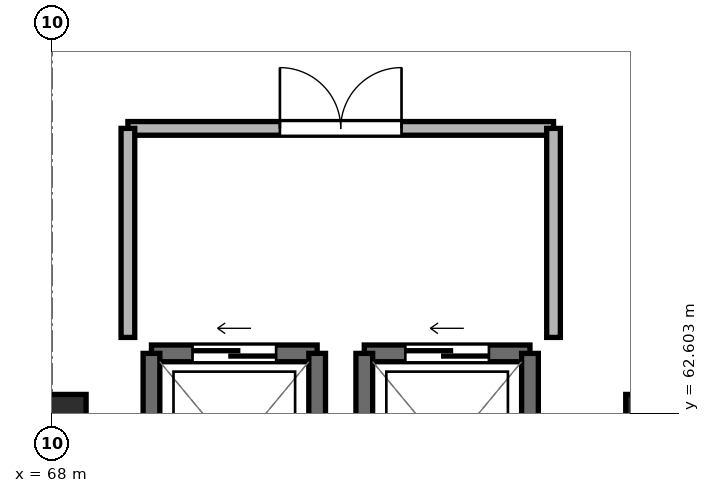
"""IFC4 building model, lengths in metres.
Left out: names, types, materials, properties, quantities, classifications, styles, units other than length and angle.
Written with IfcOpenShell. Run it as: python <this file> out.ifc"""

import sys

from ifc_helpers import new_model, si_unit, direction, frame, frame_2d, origin, origin_2d, place, context, subcontext, project, spatial, rectangle, extrude, element, fill, save


model = new_model("IFC4")
c1 = context("Model", 3, precision=1e-05, world=origin(), true_north=direction((0.0, 1.0)))
c2 = subcontext(c1, "Body", "Model", "MODEL_VIEW")
j1 = project(units=[si_unit("LENGTHUNIT", "METRE"), si_unit("PLANEANGLEUNIT", "RADIAN")], contexts=[c1])
p1 = place(None, origin())
s1 = spatial("IfcSite", under=j1, at=p1, CompositionType="ELEMENT")
p2 = place(p1, origin())
s2 = spatial("IfcBuilding", under=s1, at=p2, CompositionType="ELEMENT")
p3 = place(p2, frame((0.0, 0.0, 34.05)))
s3 = spatial("IfcBuildingStorey", under=s2, at=p3, CompositionType="ELEMENT", Elevation=34.05)
for number, where, z_axis, x_axis in (
    (1, (68.0, 62.4, -0.25), (0.0, 0.0, 1.0), (1.0, 0.0, 0.0)),
    (2, (76.0, 62.4, -0.25), (0.0, 0.0, 1.0), (1.0, 0.0, 0.0)),
):
    element("IfcColumn", number, at=place(p3, frame(where, z_axis=z_axis, x_axis=x_axis)), inside=s3, PredefinedType="COLUMN", context=c2, shape_type="SweptSolid", body=[
        extrude(rectangle(XDim=0.9, YDim=0.9, at=origin_2d()), origin(), (0.0, 0.0, 1.0), 3.25),
    ])
p4 = place(p3, frame((71.49, 63.39, 0.0), z_axis=(0.0, 0.0, 1.0), x_axis=(-1.0, 0.0, 0.0)))
e3 = element("IfcWall", 3, at=p4, inside=s3, PredefinedType="SHEAR", context=c2, shape_type="SweptSolid", body=[
    extrude(rectangle(XDim=2.18, YDim=0.22, at=frame_2d((1.09, 0.0))), origin(), (0.0, 0.0, 1.0), 3.0),
])
p5 = place(p4, frame((0.54, 0.0, 0.0)))
e4 = element("IfcOpeningElement", 4, at=p5, cuts=e3, PredefinedType="OPENING", context=c2, shape_type="SweptSolid", body=[
    extrude(rectangle(XDim=1.1, YDim=2.2, at=frame_2d((0.55, 1.1))), frame((0.0, 0.122, 0.0), z_axis=(0.0, -1.0, 0.0), x_axis=(1.0, 0.0, 0.0)), (0.0, 0.0, 1.0), 0.244),
])
for number, where, z_axis, x_axis in (
    (5, (69.31, 63.39, 0.0), (0.0, 0.0, 1.0), (0.0, -1.0, 0.0)),
    (6, (71.49, 60.81, 0.0), (0.0, 0.0, 1.0), (0.0, 1.0, 0.0)),
):
    element("IfcWall", number, at=place(p3, frame(where, z_axis=z_axis, x_axis=x_axis)), inside=s3, PredefinedType="SHEAR", context=c2, shape_type="SweptSolid", body=[
        extrude(rectangle(XDim=2.58, YDim=0.22, at=frame_2d((1.29, 0.0))), origin(), (0.0, 0.0, 1.0), 3.0),
    ])
p6 = place(p3, frame((74.29, 63.39, 0.0), z_axis=(0.0, 0.0, 1.0), x_axis=(-1.0, 0.0, 0.0)))
e7 = element("IfcWall", 7, at=p6, inside=s3, PredefinedType="SHEAR", context=c2, shape_type="SweptSolid", body=[
    extrude(rectangle(XDim=2.18, YDim=0.22, at=frame_2d((1.09, 0.0))), origin(), (0.0, 0.0, 1.0), 3.0),
])
p7 = place(p6, frame((0.54, 0.0, 0.0)))
e8 = element("IfcOpeningElement", 8, at=p7, cuts=e7, PredefinedType="OPENING", context=c2, shape_type="SweptSolid", body=[
    extrude(rectangle(XDim=1.1, YDim=2.2, at=frame_2d((0.55, 1.1))), frame((0.0, 0.122, 0.0), z_axis=(0.0, -1.0, 0.0), x_axis=(1.0, 0.0, 0.0)), (0.0, 0.0, 1.0), 0.244),
])
for number, where, z_axis, x_axis in (
    (9, (72.11, 63.39, 0.0), (0.0, 0.0, 1.0), (0.0, -1.0, 0.0)),
    (10, (74.29, 60.81, 0.0), (0.0, 0.0, 1.0), (0.0, 1.0, 0.0)),
):
    element("IfcWall", number, at=place(p3, frame(where, z_axis=z_axis, x_axis=x_axis)), inside=s3, PredefinedType="SHEAR", context=c2, shape_type="SweptSolid", body=[
        extrude(rectangle(XDim=2.58, YDim=0.22, at=frame_2d((1.29, 0.0))), origin(), (0.0, 0.0, 1.0), 3.0),
    ])
p8 = place(p3, frame((69.0, 66.35, 0.0), z_axis=(0.0, 0.0, 1.0), x_axis=(1.0, 0.0, 0.0)))
e11 = element("IfcWall", 11, at=p8, inside=s3, PredefinedType="PARTITIONING", context=c2, shape_type="SweptSolid", body=[
    extrude(rectangle(XDim=5.6, YDim=0.18, at=frame_2d((2.8, 0.0))), origin(), (0.0, 0.0, 1.0), 2.53),
])
p9 = place(p8, frame((2.0, 0.0, 0.0)))
e12 = element("IfcOpeningElement", 12, at=p9, cuts=e11, PredefinedType="OPENING", context=c2, shape_type="SweptSolid", body=[
    extrude(rectangle(XDim=1.6, YDim=2.2, at=frame_2d((0.8, 1.1))), frame((0.0, 0.102, 0.0), z_axis=(0.0, -1.0, 0.0), x_axis=(1.0, 0.0, 0.0)), (0.0, 0.0, 1.0), 0.204),
])
for number, where, z_axis, x_axis in (
    (13, (69.0, 63.6, 0.0), (0.0, 0.0, 1.0), (0.0, 1.0, 0.0)),
    (14, (74.6, 63.6, 0.0), (0.0, 0.0, 1.0), (0.0, 1.0, 0.0)),
):
    element("IfcWall", number, at=place(p3, frame(where, z_axis=z_axis, x_axis=x_axis)), inside=s3, PredefinedType="PARTITIONING", context=c2, shape_type="SweptSolid", body=[
        extrude(rectangle(XDim=2.75, YDim=0.18, at=frame_2d((1.375, 0.0))), origin(), (0.0, 0.0, 1.0), 2.53),
    ])
p10 = place(p5, origin())
e15 = element("IfcDoor", 15, at=p10, inside=s3, OperationType="SLIDING_TO_RIGHT", PredefinedType="DOOR", context=c2, shape_type="SweptSolid", body=[
    extrude(rectangle(XDim=1.1, YDim=2.2, at=frame_2d((0.55, 1.1))), frame((0.0, 0.025, 0.0), z_axis=(0.0, -1.0, 0.0), x_axis=(1.0, 0.0, 0.0)), (0.0, 0.0, 1.0), 0.05),
])
fill(e4, e15)
p11 = place(p7, origin())
e16 = element("IfcDoor", 16, at=p11, inside=s3, OperationType="SLIDING_TO_RIGHT", PredefinedType="DOOR", context=c2, shape_type="SweptSolid", body=[
    extrude(rectangle(XDim=1.1, YDim=2.2, at=frame_2d((0.55, 1.1))), frame((0.0, 0.025, 0.0), z_axis=(0.0, -1.0, 0.0), x_axis=(1.0, 0.0, 0.0)), (0.0, 0.0, 1.0), 0.05),
])
fill(e8, e16)
p12 = place(p9, origin())
e17 = element("IfcDoor", 17, at=p12, inside=s3, OperationType="DOUBLE_DOOR_SINGLE_SWING", PredefinedType="DOOR", context=c2, shape_type="SweptSolid", body=[
    extrude(rectangle(XDim=1.6, YDim=2.2, at=frame_2d((0.8, 1.1))), frame((0.0, 0.025, 0.0), z_axis=(0.0, -1.0, 0.0), x_axis=(1.0, 0.0, 0.0)), (0.0, 0.0, 1.0), 0.05),
])
fill(e12, e17)
save(model, sys.argv[1])
